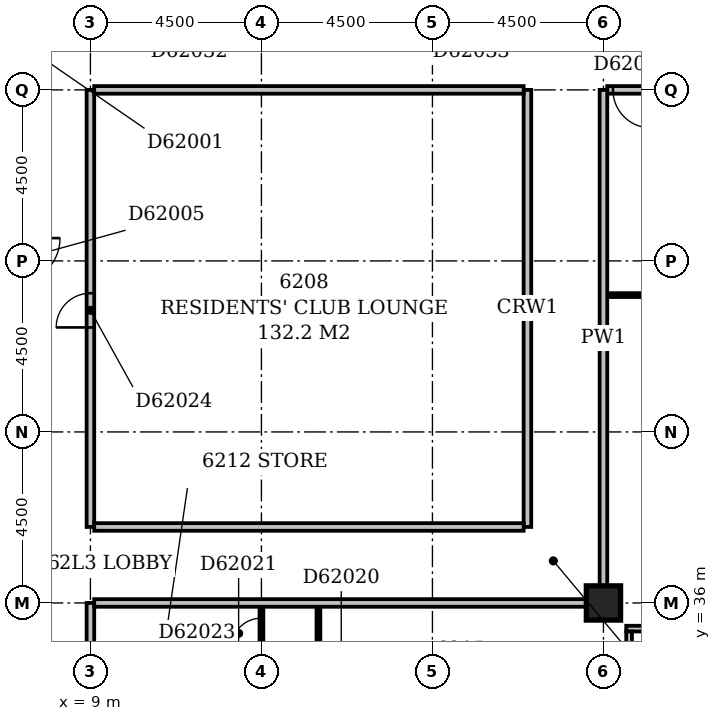
"""IFC4 building model, lengths in metres.
Left out: names, types, materials, properties, quantities, classifications, styles, units other than length and angle.
Written with IfcOpenShell. Run it as: python <this file> out.ifc"""

import sys

from ifc_helpers import new_model, si_unit, direction, frame, frame_2d, origin, origin_2d, place, context, subcontext, project, spatial, rectangle, extrude, element, fill, save


model = new_model("IFC4")
c1 = context("Model", 3, precision=1e-05, world=origin(), true_north=direction((0.0, 1.0)))
c2 = subcontext(c1, "Body", "Model", "MODEL_VIEW")
j1 = project(units=[si_unit("LENGTHUNIT", "METRE"), si_unit("PLANEANGLEUNIT", "RADIAN")], contexts=[c1])
p1 = place(None, origin())
s1 = spatial("IfcSite", under=j1, at=p1, CompositionType="ELEMENT")
p2 = place(p1, origin())
s2 = spatial("IfcBuilding", under=s1, at=p2, CompositionType="ELEMENT")
p3 = place(p2, frame((0.0, 0.0, 240.2)))
s3 = spatial("IfcBuildingStorey", under=s2, at=p3, CompositionType="ELEMENT", Elevation=240.2)
p4 = place(p3, frame((22.5, 36.0, -0.3), z_axis=(0.0, 0.0, 1.0), x_axis=(1.0, 0.0, 0.0)))
e1 = element("IfcColumn", 1, at=p4, inside=s3, PredefinedType="COLUMN", context=c2, shape_type="SweptSolid", body=[
    extrude(rectangle(XDim=0.9, YDim=0.9, at=origin_2d()), origin(), (0.0, 0.0, 1.0), 3.6),
])
p5 = place(p3, frame((23.175, 17.4, 0.0), z_axis=(0.0, 0.0, 1.0), x_axis=(0.0, 1.0, 0.0)))
e2 = element("IfcWall", 2, at=p5, inside=s3, PredefinedType="STANDARD", context=c2, shape_type="SweptSolid", body=[
    extrude(rectangle(XDim=17.85, YDim=0.15, at=frame_2d((8.925, 0.0))), origin(), (0.0, 0.0, 1.0), 2.7),
])
p6 = place(p5, frame((1.65, 0.0, 0.6)))
e3 = element("IfcOpeningElement", 3, at=p6, cuts=e2, PredefinedType="OPENING", context=c2, shape_type="SweptSolid", body=[
    extrude(rectangle(XDim=2.4, YDim=1.8, at=frame_2d((1.2, 0.9))), frame((0.0, 0.087, 0.0), z_axis=(0.0, -1.0, 0.0), x_axis=(1.0, 0.0, 0.0)), (0.0, 0.0, 1.0), 0.174),
])
p7 = place(p5, frame((7.936, 0.0, 0.6)))
e4 = element("IfcOpeningElement", 4, at=p7, cuts=e2, PredefinedType="OPENING", context=c2, shape_type="SweptSolid", body=[
    extrude(rectangle(XDim=0.9, YDim=1.8, at=frame_2d((0.45, 0.9))), frame((0.0, 0.087, 0.0), z_axis=(0.0, -1.0, 0.0), x_axis=(1.0, 0.0, 0.0)), (0.0, 0.0, 1.0), 0.174),
])
p8 = place(p5, frame((10.65, 0.0, 0.6)))
e5 = element("IfcOpeningElement", 5, at=p8, cuts=e2, PredefinedType="OPENING", context=c2, shape_type="SweptSolid", body=[
    extrude(rectangle(XDim=2.4, YDim=1.8, at=frame_2d((1.2, 0.9))), frame((0.0, 0.087, 0.0), z_axis=(0.0, -1.0, 0.0), x_axis=(1.0, 0.0, 0.0)), (0.0, 0.0, 1.0), 0.174),
])
p9 = place(p5, frame((15.15, 0.0, 0.6)))
e6 = element("IfcOpeningElement", 6, at=p9, cuts=e2, PredefinedType="OPENING", context=c2, shape_type="SweptSolid", body=[
    extrude(rectangle(XDim=2.4, YDim=1.8, at=frame_2d((1.2, 0.9))), frame((0.0, 0.087, 0.0), z_axis=(0.0, -1.0, 0.0), x_axis=(1.0, 0.0, 0.0)), (0.0, 0.0, 1.0), 0.174),
])
p10 = place(p3, frame((23.1, 35.325, 0.0), z_axis=(0.0, 0.0, 1.0), x_axis=(1.0, 0.0, 0.0)))
e7 = element("IfcWall", 7, at=p10, inside=s3, PredefinedType="STANDARD", context=c2, shape_type="SweptSolid", body=[
    extrude(rectangle(XDim=3.9, YDim=0.15, at=frame_2d((1.95, 0.0))), origin(), (0.0, 0.0, 1.0), 2.7),
])
p11 = place(p10, frame((0.45, 0.0, 0.6)))
e8 = element("IfcOpeningElement", 8, at=p11, cuts=e7, PredefinedType="OPENING", context=c2, shape_type="SweptSolid", body=[
    extrude(rectangle(XDim=2.4, YDim=1.8, at=frame_2d((1.2, 0.9))), frame((0.0, 0.087, 0.0), z_axis=(0.0, -1.0, 0.0), x_axis=(1.0, 0.0, 0.0)), (0.0, 0.0, 1.0), 0.174),
])
p12 = place(p3, frame((9.0, 18.45, 0.0), z_axis=(0.0, 0.0, 1.0), x_axis=(0.0, 1.0, 0.0)))
e9 = element("IfcWall", 9, at=p12, inside=s3, PredefinedType="PARTITIONING", context=c2, shape_type="SweptSolid", body=[
    extrude(rectangle(XDim=17.55, YDim=0.2, at=frame_2d((8.775, 0.0))), origin(), (0.0, 0.0, 1.0), 3.3),
])
p13 = place(p12, frame((4.35, 0.0, 0.0)))
e10 = element("IfcOpeningElement", 10, at=p13, cuts=e9, PredefinedType="OPENING", context=c2, shape_type="SweptSolid", body=[
    extrude(rectangle(XDim=1.0, YDim=2.1, at=frame_2d((0.5, 1.05))), frame((0.0, 0.112, 0.0), z_axis=(0.0, -1.0, 0.0), x_axis=(1.0, 0.0, 0.0)), (0.0, 0.0, 1.0), 0.224),
])
p14 = place(p12, frame((2.8, 0.0, 0.0)))
e11 = element("IfcOpeningElement", 11, at=p14, cuts=e9, PredefinedType="OPENING", context=c2, shape_type="SweptSolid", body=[
    extrude(rectangle(XDim=1.0, YDim=2.1, at=frame_2d((0.5, 1.05))), frame((0.0, 0.112, 0.0), z_axis=(0.0, -1.0, 0.0), x_axis=(1.0, 0.0, 0.0)), (0.0, 0.0, 1.0), 0.224),
])
p15 = place(p3, frame((15.0, 22.6, 0.0), z_axis=(0.0, 0.0, 1.0), x_axis=(0.0, 1.0, 0.0)))
e12 = element("IfcWall", 12, at=p15, inside=s3, PredefinedType="PARTITIONING", context=c2, shape_type="SweptSolid", body=[
    extrude(rectangle(XDim=13.3, YDim=0.1, at=frame_2d((6.65, 0.0))), origin(), (0.0, 0.0, 1.0), 3.3),
])
p16 = place(p15, frame((1.7, 0.0, 0.0)))
e13 = element("IfcOpeningElement", 13, at=p16, cuts=e12, PredefinedType="OPENING", context=c2, shape_type="SweptSolid", body=[
    extrude(rectangle(XDim=0.9, YDim=2.1, at=frame_2d((0.45, 1.05))), frame((0.0, 0.062, 0.0), z_axis=(0.0, -1.0, 0.0), x_axis=(1.0, 0.0, 0.0)), (0.0, 0.0, 1.0), 0.124),
])
p17 = place(p15, frame((6.2, 0.0, 0.0)))
e14 = element("IfcOpeningElement", 14, at=p17, cuts=e12, PredefinedType="OPENING", context=c2, shape_type="SweptSolid", body=[
    extrude(rectangle(XDim=0.9, YDim=2.1, at=frame_2d((0.45, 1.05))), frame((0.0, 0.062, 0.0), z_axis=(0.0, -1.0, 0.0), x_axis=(1.0, 0.0, 0.0)), (0.0, 0.0, 1.0), 0.124),
])
p18 = place(p15, frame((10.7, 0.0, 0.0)))
e15 = element("IfcOpeningElement", 15, at=p18, cuts=e12, PredefinedType="OPENING", context=c2, shape_type="SweptSolid", body=[
    extrude(rectangle(XDim=0.9, YDim=2.1, at=frame_2d((0.45, 1.05))), frame((0.0, 0.062, 0.0), z_axis=(0.0, -1.0, 0.0), x_axis=(1.0, 0.0, 0.0)), (0.0, 0.0, 1.0), 0.124),
])
p19 = place(p3, frame((13.5, 24.1, 0.0), z_axis=(0.0, 0.0, 1.0), x_axis=(0.0, 1.0, 0.0)))
e16 = element("IfcWall", 16, at=p19, inside=s3, PredefinedType="PARTITIONING", context=c2, shape_type="SweptSolid", body=[
    extrude(rectangle(XDim=11.8, YDim=0.1, at=frame_2d((5.9, 0.0))), origin(), (0.0, 0.0, 1.0), 3.3),
])
p20 = place(p19, frame((8.7, 0.0, 0.0)))
e17 = element("IfcOpeningElement", 17, at=p20, cuts=e16, PredefinedType="OPENING", context=c2, shape_type="SweptSolid", body=[
    extrude(rectangle(XDim=0.8, YDim=2.1, at=frame_2d((0.4, 1.05))), frame((0.0, 0.062, 0.0), z_axis=(0.0, -1.0, 0.0), x_axis=(1.0, 0.0, 0.0)), (0.0, 0.0, 1.0), 0.124),
])
p21 = place(p19, frame((3.5, 0.0, 0.0)))
e18 = element("IfcOpeningElement", 18, at=p21, cuts=e16, PredefinedType="OPENING", context=c2, shape_type="SweptSolid", body=[
    extrude(rectangle(XDim=0.9, YDim=2.1, at=frame_2d((0.45, 1.05))), frame((0.0, 0.062, 0.0), z_axis=(0.0, -1.0, 0.0), x_axis=(1.0, 0.0, 0.0)), (0.0, 0.0, 1.0), 0.124),
])
p22 = place(p19, frame((10.7, 0.0, 0.0)))
e19 = element("IfcOpeningElement", 19, at=p22, cuts=e16, PredefinedType="OPENING", context=c2, shape_type="SweptSolid", body=[
    extrude(rectangle(XDim=0.8, YDim=2.1, at=frame_2d((0.4, 1.05))), frame((0.0, 0.062, 0.0), z_axis=(0.0, -1.0, 0.0), x_axis=(1.0, 0.0, 0.0)), (0.0, 0.0, 1.0), 0.124),
])
p23 = place(p3, frame((9.1, 36.0, 0.0), z_axis=(0.0, 0.0, 1.0), x_axis=(1.0, 0.0, 0.0)))
e20 = element("IfcWall", 20, at=p23, inside=s3, PredefinedType="PARTITIONING", context=c2, shape_type="SweptSolid", body=[
    extrude(rectangle(XDim=12.95, YDim=0.2, at=frame_2d((6.475, 0.0))), origin(), (0.0, 0.0, 1.0), 3.3),
])
p24 = place(p3, frame((22.5, 36.45, 0.0), z_axis=(0.0, 0.0, 1.0), x_axis=(0.0, 1.0, 0.0)))
e21 = element("IfcWall", 21, at=p24, inside=s3, PredefinedType="PARTITIONING", context=c2, shape_type="SweptSolid", body=[
    extrude(rectangle(XDim=13.05, YDim=0.2, at=frame_2d((6.525, 0.0))), origin(), (0.0, 0.0, 1.0), 3.3),
])
p25 = place(p3, frame((9.0, 38.0, 0.0), z_axis=(0.0, 0.0, 1.0), x_axis=(0.0, 1.0, 0.0)))
e22 = element("IfcWall", 22, at=p25, inside=s3, PredefinedType="PARTITIONING", context=c2, shape_type="SweptSolid", body=[
    extrude(rectangle(XDim=11.5, YDim=0.2, at=frame_2d((5.75, 0.0))), origin(), (0.0, 0.0, 1.0), 3.3),
])
p26 = place(p25, frame((5.25, 0.0, 0.0)))
e23 = element("IfcOpeningElement", 23, at=p26, cuts=e22, PredefinedType="OPENING", context=c2, shape_type="SweptSolid", body=[
    extrude(rectangle(XDim=0.9, YDim=2.1, at=frame_2d((0.45, 1.05))), frame((0.0, 0.112, 0.0), z_axis=(0.0, -1.0, 0.0), x_axis=(1.0, 0.0, 0.0)), (0.0, 0.0, 1.0), 0.224),
])
p27 = place(p3, frame((9.1, 38.0, 0.0), z_axis=(0.0, 0.0, 1.0), x_axis=(1.0, 0.0, 0.0)))
e24 = element("IfcWall", 24, at=p27, inside=s3, PredefinedType="PARTITIONING", context=c2, shape_type="SweptSolid", body=[
    extrude(rectangle(XDim=11.3, YDim=0.2, at=frame_2d((5.65, 0.0))), origin(), (0.0, 0.0, 1.0), 3.3),
])
p28 = place(p3, frame((20.5, 38.0, 0.0), z_axis=(0.0, 0.0, 1.0), x_axis=(0.0, 1.0, 0.0)))
e25 = element("IfcWall", 25, at=p28, inside=s3, PredefinedType="PARTITIONING", context=c2, shape_type="SweptSolid", body=[
    extrude(rectangle(XDim=11.5, YDim=0.2, at=frame_2d((5.75, 0.0))), origin(), (0.0, 0.0, 1.0), 3.3),
])
p29 = place(p3, frame((22.6, 44.1, 0.0), z_axis=(0.0, 0.0, 1.0), x_axis=(1.0, 0.0, 0.0)))
e26 = element("IfcWall", 26, at=p29, inside=s3, PredefinedType="PARTITIONING", context=c2, shape_type="SweptSolid", body=[
    extrude(rectangle(XDim=4.4, YDim=0.1, at=frame_2d((2.2, 0.0))), origin(), (0.0, 0.0, 1.0), 3.3),
])
p30 = place(p29, frame((1.7, 0.0, 0.0)))
e27 = element("IfcOpeningElement", 27, at=p30, cuts=e26, PredefinedType="OPENING", context=c2, shape_type="SweptSolid", body=[
    extrude(rectangle(XDim=0.9, YDim=2.1, at=frame_2d((0.45, 1.05))), frame((0.0, 0.062, 0.0), z_axis=(0.0, -1.0, 0.0), x_axis=(1.0, 0.0, 0.0)), (0.0, 0.0, 1.0), 0.124),
])
p31 = place(p3, frame((9.1, 49.5, 0.0), z_axis=(0.0, 0.0, 1.0), x_axis=(1.0, 0.0, 0.0)))
e28 = element("IfcWall", 28, at=p31, inside=s3, PredefinedType="PARTITIONING", context=c2, shape_type="SweptSolid", body=[
    extrude(rectangle(XDim=11.3, YDim=0.2, at=frame_2d((5.65, 0.0))), origin(), (0.0, 0.0, 1.0), 3.3),
])
p32 = place(p3, frame((22.6, 49.5, 0.0), z_axis=(0.0, 0.0, 1.0), x_axis=(1.0, 0.0, 0.0)))
e29 = element("IfcWall", 29, at=p32, inside=s3, PredefinedType="PARTITIONING", context=c2, shape_type="SweptSolid", body=[
    extrude(rectangle(XDim=4.4, YDim=0.2, at=frame_2d((2.2, 0.0))), origin(), (0.0, 0.0, 1.0), 3.3),
])
p33 = place(p32, frame((0.15, 0.0, 0.0)))
e30 = element("IfcOpeningElement", 30, at=p33, cuts=e29, PredefinedType="OPENING", context=c2, shape_type="SweptSolid", body=[
    extrude(rectangle(XDim=1.0, YDim=2.1, at=frame_2d((0.5, 1.05))), frame((0.0, 0.112, 0.0), z_axis=(0.0, -1.0, 0.0), x_axis=(1.0, 0.0, 0.0)), (0.0, 0.0, 1.0), 0.224),
])
p34 = place(p22, origin())
e31 = element("IfcDoor", 31, at=p34, inside=s3, OperationType="SINGLE_SWING_LEFT", PredefinedType="DOOR", context=c2, shape_type="SweptSolid", body=[
    extrude(rectangle(XDim=0.8, YDim=2.1, at=frame_2d((0.4, 1.05))), frame((0.0, 0.025, 0.0), z_axis=(0.0, -1.0, 0.0), x_axis=(1.0, 0.0, 0.0)), (0.0, 0.0, 1.0), 0.05),
])
fill(e19, e31)
p35 = place(p26, origin())
e32 = element("IfcDoor", 32, at=p35, inside=s3, OperationType="SINGLE_SWING_LEFT", PredefinedType="DOOR", context=c2, shape_type="SweptSolid", body=[
    extrude(rectangle(XDim=0.9, YDim=2.1, at=frame_2d((0.45, 1.05))), frame((0.0, 0.025, 0.0), z_axis=(0.0, -1.0, 0.0), x_axis=(1.0, 0.0, 0.0)), (0.0, 0.0, 1.0), 0.05),
])
fill(e23, e32)
p36 = place(p33, origin())
e33 = element("IfcDoor", 33, at=p36, inside=s3, OperationType="SINGLE_SWING_RIGHT", PredefinedType="DOOR", context=c2, shape_type="SweptSolid", body=[
    extrude(rectangle(XDim=1.0, YDim=2.1, at=frame_2d((0.5, 1.05))), frame((0.0, 0.025, 0.0), z_axis=(0.0, -1.0, 0.0), x_axis=(1.0, 0.0, 0.0)), (0.0, 0.0, 1.0), 0.05),
])
fill(e30, e33)
save(model, sys.argv[1])
